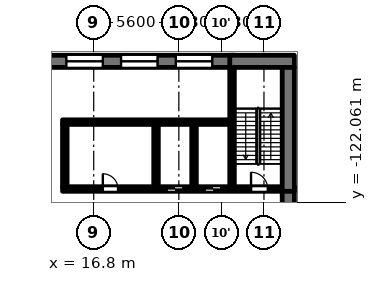
"""IFC4 building model, lengths in metres.
Left out: names, types, materials, properties, quantities, classifications, styles, units other than length and angle.
Written with IfcOpenShell. Run it as: python <this file> out.ifc"""

import sys

from ifc_helpers import new_model, si_unit, direction, frame, frame_2d, origin, place, context, subcontext, project, spatial, rectangle, extrude, element, fill, save


model = new_model("IFC4")
c1 = context("Model", 3, precision=1e-05, world=origin(), true_north=direction((0.0, 1.0)))
c2 = subcontext(c1, "Body", "Model", "MODEL_VIEW")
j1 = project(units=[si_unit("LENGTHUNIT", "METRE"), si_unit("PLANEANGLEUNIT", "RADIAN")], contexts=[c1])
p1 = place(None, origin())
s1 = spatial("IfcSite", under=j1, at=p1, CompositionType="ELEMENT")
p2 = place(p1, origin())
s2 = spatial("IfcBuilding", under=s1, at=p2, CompositionType="ELEMENT")
p3 = place(p2, frame((0.0, 0.0, 6.5)))
s3 = spatial("IfcBuildingStorey", under=s2, at=p3, CompositionType="ELEMENT", Elevation=6.5)
p4 = place(p3, frame((14.75, -121.2, 0.0), z_axis=(0.0, 0.0, 1.0), x_axis=(1.0, 0.0, 0.0)))
e1 = element("IfcWall", 1, at=p4, inside=s3, PredefinedType="SOLIDWALL", context=c2, shape_type="SweptSolid", body=[
    extrude(rectangle(XDim=14.45, YDim=0.3, at=frame_2d((7.225, 0.0))), origin(), (0.0, 0.0, 1.0), 4.45),
])
p5 = place(p4, frame((6.85, 0.0, 0.0)))
e2 = element("IfcOpeningElement", 2, at=p5, cuts=e1, PredefinedType="OPENING", context=c2, shape_type="SweptSolid", body=[
    extrude(rectangle(XDim=1.1, YDim=2.1, at=frame_2d((0.55, 1.05))), frame((0.0, 0.16, 0.0), z_axis=(0.0, -1.0, 0.0), x_axis=(1.0, 0.0, 0.0)), (0.0, 0.0, 1.0), 0.32),
])
p6 = place(p4, frame((9.35, 0.0, 0.0)))
e3 = element("IfcOpeningElement", 3, at=p6, cuts=e1, PredefinedType="OPENING", context=c2, shape_type="SweptSolid", body=[
    extrude(rectangle(XDim=1.1, YDim=2.1, at=frame_2d((0.55, 1.05))), frame((0.0, 0.16, 0.0), z_axis=(0.0, -1.0, 0.0), x_axis=(1.0, 0.0, 0.0)), (0.0, 0.0, 1.0), 0.32),
])
p7 = place(p4, frame((12.4, 0.0, 0.0)))
e4 = element("IfcOpeningElement", 4, at=p7, cuts=e1, PredefinedType="OPENING", context=c2, shape_type="SweptSolid", body=[
    extrude(rectangle(XDim=1.1, YDim=2.1, at=frame_2d((0.55, 1.05))), frame((0.0, 0.16, 0.0), z_axis=(0.0, -1.0, 0.0), x_axis=(1.0, 0.0, 0.0)), (0.0, 0.0, 1.0), 0.32),
])
p8 = place(p4, frame((2.65, 0.0, 0.0)))
e5 = element("IfcOpeningElement", 5, at=p8, cuts=e1, PredefinedType="OPENING", context=c2, shape_type="SweptSolid", body=[
    extrude(rectangle(XDim=1.0, YDim=2.1, at=frame_2d((0.5, 1.05))), frame((0.0, 0.16, 0.0), z_axis=(0.0, -1.0, 0.0), x_axis=(1.0, 0.0, 0.0)), (0.0, 0.0, 1.0), 0.32),
])
p9 = place(p3, frame((14.75, -116.8, 0.0), z_axis=(0.0, 0.0, 1.0), x_axis=(1.0, 0.0, 0.0)))
e6 = element("IfcWall", 6, at=p9, inside=s3, PredefinedType="SOLIDWALL", context=c2, shape_type="SweptSolid", body=[
    extrude(rectangle(XDim=11.0, YDim=0.3, at=frame_2d((5.5, 0.0))), origin(), (0.0, 0.0, 1.0), 4.45),
])
p10 = place(p3, frame((-26.05, -112.8, 0.0), z_axis=(0.0, 0.0, 1.0), x_axis=(1.0, 0.0, 0.0)))
e7 = element("IfcWall", 7, at=p10, inside=s3, PredefinedType="SOLIDWALL", context=c2, shape_type="SweptSolid", body=[
    extrude(rectangle(XDim=52.1, YDim=0.8, at=frame_2d((26.05, 0.0))), origin(), (0.0, 0.0, 1.0), 4.45),
])
p11 = place(p10, frame((1.45, 0.0, 0.6)))
e8 = element("IfcOpeningElement", 8, at=p11, cuts=e7, PredefinedType="OPENING", context=c2, shape_type="SweptSolid", body=[
    extrude(rectangle(XDim=2.4, YDim=3.2, at=frame_2d((1.2, 1.6))), frame((0.0, 0.41, 0.0), z_axis=(0.0, -1.0, 0.0), x_axis=(1.0, 0.0, 0.0)), (0.0, 0.0, 1.0), 0.82),
])
p12 = place(p10, frame((5.05, 0.0, 0.6)))
e9 = element("IfcOpeningElement", 9, at=p12, cuts=e7, PredefinedType="OPENING", context=c2, shape_type="SweptSolid", body=[
    extrude(rectangle(XDim=2.4, YDim=3.2, at=frame_2d((1.2, 1.6))), frame((0.0, 0.41, 0.0), z_axis=(0.0, -1.0, 0.0), x_axis=(1.0, 0.0, 0.0)), (0.0, 0.0, 1.0), 0.82),
])
p13 = place(p10, frame((8.65, 0.0, 0.6)))
e10 = element("IfcOpeningElement", 10, at=p13, cuts=e7, PredefinedType="OPENING", context=c2, shape_type="SweptSolid", body=[
    extrude(rectangle(XDim=2.4, YDim=3.2, at=frame_2d((1.2, 1.6))), frame((0.0, 0.41, 0.0), z_axis=(0.0, -1.0, 0.0), x_axis=(1.0, 0.0, 0.0)), (0.0, 0.0, 1.0), 0.82),
])
p14 = place(p10, frame((12.25, 0.0, 0.6)))
e11 = element("IfcOpeningElement", 11, at=p14, cuts=e7, PredefinedType="OPENING", context=c2, shape_type="SweptSolid", body=[
    extrude(rectangle(XDim=2.4, YDim=3.2, at=frame_2d((1.2, 1.6))), frame((0.0, 0.41, 0.0), z_axis=(0.0, -1.0, 0.0), x_axis=(1.0, 0.0, 0.0)), (0.0, 0.0, 1.0), 0.82),
])
p15 = place(p10, frame((15.85, 0.0, 0.6)))
e12 = element("IfcOpeningElement", 12, at=p15, cuts=e7, PredefinedType="OPENING", context=c2, shape_type="SweptSolid", body=[
    extrude(rectangle(XDim=2.4, YDim=3.2, at=frame_2d((1.2, 1.6))), frame((0.0, 0.41, 0.0), z_axis=(0.0, -1.0, 0.0), x_axis=(1.0, 0.0, 0.0)), (0.0, 0.0, 1.0), 0.82),
])
p16 = place(p10, frame((19.45, 0.0, 0.6)))
e13 = element("IfcOpeningElement", 13, at=p16, cuts=e7, PredefinedType="OPENING", context=c2, shape_type="SweptSolid", body=[
    extrude(rectangle(XDim=2.4, YDim=3.2, at=frame_2d((1.2, 1.6))), frame((0.0, 0.41, 0.0), z_axis=(0.0, -1.0, 0.0), x_axis=(1.0, 0.0, 0.0)), (0.0, 0.0, 1.0), 0.82),
])
p17 = place(p10, frame((23.05, 0.0, 0.6)))
e14 = element("IfcOpeningElement", 14, at=p17, cuts=e7, PredefinedType="OPENING", context=c2, shape_type="SweptSolid", body=[
    extrude(rectangle(XDim=2.4, YDim=3.2, at=frame_2d((1.2, 1.6))), frame((0.0, 0.41, 0.0), z_axis=(0.0, -1.0, 0.0), x_axis=(1.0, 0.0, 0.0)), (0.0, 0.0, 1.0), 0.82),
])
p18 = place(p10, frame((26.65, 0.0, 0.6)))
e15 = element("IfcOpeningElement", 15, at=p18, cuts=e7, PredefinedType="OPENING", context=c2, shape_type="SweptSolid", body=[
    extrude(rectangle(XDim=2.4, YDim=3.2, at=frame_2d((1.2, 1.6))), frame((0.0, 0.41, 0.0), z_axis=(0.0, -1.0, 0.0), x_axis=(1.0, 0.0, 0.0)), (0.0, 0.0, 1.0), 0.82),
])
p19 = place(p10, frame((30.25, 0.0, 0.6)))
e16 = element("IfcOpeningElement", 16, at=p19, cuts=e7, PredefinedType="OPENING", context=c2, shape_type="SweptSolid", body=[
    extrude(rectangle(XDim=2.4, YDim=3.2, at=frame_2d((1.2, 1.6))), frame((0.0, 0.41, 0.0), z_axis=(0.0, -1.0, 0.0), x_axis=(1.0, 0.0, 0.0)), (0.0, 0.0, 1.0), 0.82),
])
p20 = place(p10, frame((33.85, 0.0, 0.6)))
e17 = element("IfcOpeningElement", 17, at=p20, cuts=e7, PredefinedType="OPENING", context=c2, shape_type="SweptSolid", body=[
    extrude(rectangle(XDim=2.4, YDim=3.2, at=frame_2d((1.2, 1.6))), frame((0.0, 0.41, 0.0), z_axis=(0.0, -1.0, 0.0), x_axis=(1.0, 0.0, 0.0)), (0.0, 0.0, 1.0), 0.82),
])
p21 = place(p10, frame((37.45, 0.0, 0.6)))
e18 = element("IfcOpeningElement", 18, at=p21, cuts=e7, PredefinedType="OPENING", context=c2, shape_type="SweptSolid", body=[
    extrude(rectangle(XDim=2.4, YDim=3.2, at=frame_2d((1.2, 1.6))), frame((0.0, 0.41, 0.0), z_axis=(0.0, -1.0, 0.0), x_axis=(1.0, 0.0, 0.0)), (0.0, 0.0, 1.0), 0.82),
])
p22 = place(p10, frame((41.05, 0.0, 0.6)))
e19 = element("IfcOpeningElement", 19, at=p22, cuts=e7, PredefinedType="OPENING", context=c2, shape_type="SweptSolid", body=[
    extrude(rectangle(XDim=2.4, YDim=3.2, at=frame_2d((1.2, 1.6))), frame((0.0, 0.41, 0.0), z_axis=(0.0, -1.0, 0.0), x_axis=(1.0, 0.0, 0.0)), (0.0, 0.0, 1.0), 0.82),
])
p23 = place(p10, frame((44.65, 0.0, 0.6)))
e20 = element("IfcOpeningElement", 20, at=p23, cuts=e7, PredefinedType="OPENING", context=c2, shape_type="SweptSolid", body=[
    extrude(rectangle(XDim=2.4, YDim=3.2, at=frame_2d((1.2, 1.6))), frame((0.0, 0.41, 0.0), z_axis=(0.0, -1.0, 0.0), x_axis=(1.0, 0.0, 0.0)), (0.0, 0.0, 1.0), 0.82),
])
p24 = place(p10, frame((48.25, 0.0, 0.6)))
e21 = element("IfcOpeningElement", 21, at=p24, cuts=e7, PredefinedType="OPENING", context=c2, shape_type="SweptSolid", body=[
    extrude(rectangle(XDim=2.4, YDim=3.2, at=frame_2d((1.2, 1.6))), frame((0.0, 0.41, 0.0), z_axis=(0.0, -1.0, 0.0), x_axis=(1.0, 0.0, 0.0)), (0.0, 0.0, 1.0), 0.82),
])
p25 = place(p3, frame((25.75, -112.8, 0.0), z_axis=(0.0, 0.0, 1.0), x_axis=(1.0, 0.0, 0.0)))
e22 = element("IfcWall", 22, at=p25, inside=s3, PredefinedType="SOLIDWALL", context=c2, shape_type="SweptSolid", body=[
    extrude(rectangle(XDim=4.25, YDim=0.8, at=frame_2d((2.125, 0.0))), origin(), (0.0, 0.0, 1.0), 4.45),
])
for number, where, z_axis, x_axis in (
    (23, (14.9, -121.05, 0.0), (0.0, 0.0, 1.0), (0.0, 1.0, 0.0)),
    (24, (20.9, -121.05, 0.0), (0.0, 0.0, 1.0), (0.0, 1.0, 0.0)),
    (25, (23.4, -121.05, 0.0), (0.0, 0.0, 1.0), (0.0, 1.0, 0.0)),
):
    element("IfcWall", number, at=place(p3, frame(where, z_axis=z_axis, x_axis=x_axis)), inside=s3, PredefinedType="SOLIDWALL", context=c2, shape_type="SweptSolid", body=[
        extrude(rectangle(XDim=4.1, YDim=0.3, at=frame_2d((2.05, 0.0))), origin(), (0.0, 0.0, 1.0), 4.45),
    ])
p26 = place(p3, frame((25.9, -121.05, 0.0), z_axis=(0.0, 0.0, 1.0), x_axis=(0.0, 1.0, 0.0)))
e26 = element("IfcWall", 26, at=p26, inside=s3, PredefinedType="SOLIDWALL", context=c2, shape_type="SweptSolid", body=[
    extrude(rectangle(XDim=7.85, YDim=0.3, at=frame_2d((3.925, 0.0))), origin(), (0.0, 0.0, 1.0), 4.45),
])
p27 = place(p3, frame((29.6, -121.05, 0.0), z_axis=(0.0, 0.0, 1.0), x_axis=(0.0, -1.0, 0.0)))
e27 = element("IfcWall", 27, at=p27, inside=s3, PredefinedType="SOLIDWALL", context=c2, shape_type="SweptSolid", body=[
    extrude(rectangle(XDim=3.875, YDim=0.8, at=frame_2d((1.938, 0.0))), origin(), (0.0, 0.0, 1.0), 4.45),
])
p28 = place(p3, frame((29.6, -113.2, 0.0), z_axis=(0.0, 0.0, 1.0), x_axis=(0.0, -1.0, 0.0)))
e28 = element("IfcWall", 28, at=p28, inside=s3, PredefinedType="SOLIDWALL", context=c2, shape_type="SweptSolid", body=[
    extrude(rectangle(XDim=8.15, YDim=0.8, at=frame_2d((4.075, 0.0))), origin(), (0.0, 0.0, 1.0), 4.45),
])
p29 = place(p22, origin())
e29 = element("IfcWindow", 29, at=p29, inside=s3, PartitioningType="SINGLE_PANEL", PredefinedType="WINDOW", context=c2, shape_type="SweptSolid", body=[
    extrude(rectangle(XDim=2.4, YDim=3.2, at=frame_2d((1.2, 1.6))), frame((0.0, 0.03, 0.0), z_axis=(0.0, -1.0, 0.0), x_axis=(1.0, 0.0, 0.0)), (0.0, 0.0, 1.0), 0.06),
])
fill(e19, e29)
p30 = place(p23, origin())
e30 = element("IfcWindow", 30, at=p30, inside=s3, PartitioningType="SINGLE_PANEL", PredefinedType="WINDOW", context=c2, shape_type="SweptSolid", body=[
    extrude(rectangle(XDim=2.4, YDim=3.2, at=frame_2d((1.2, 1.6))), frame((0.0, 0.03, 0.0), z_axis=(0.0, -1.0, 0.0), x_axis=(1.0, 0.0, 0.0)), (0.0, 0.0, 1.0), 0.06),
])
fill(e20, e30)
p31 = place(p24, origin())
e31 = element("IfcWindow", 31, at=p31, inside=s3, PartitioningType="SINGLE_PANEL", PredefinedType="WINDOW", context=c2, shape_type="SweptSolid", body=[
    extrude(rectangle(XDim=2.4, YDim=3.2, at=frame_2d((1.2, 1.6))), frame((0.0, 0.03, 0.0), z_axis=(0.0, -1.0, 0.0), x_axis=(1.0, 0.0, 0.0)), (0.0, 0.0, 1.0), 0.06),
])
fill(e21, e31)
p32 = place(p5, origin())
e32 = element("IfcDoor", 32, at=p32, inside=s3, OperationType="DOUBLE_DOOR_SLIDING", PredefinedType="DOOR", context=c2, shape_type="SweptSolid", body=[
    extrude(rectangle(XDim=1.1, YDim=2.1, at=frame_2d((0.55, 1.05))), frame((0.0, 0.025, 0.0), z_axis=(0.0, -1.0, 0.0), x_axis=(1.0, 0.0, 0.0)), (0.0, 0.0, 1.0), 0.05),
])
fill(e2, e32)
p33 = place(p6, origin())
e33 = element("IfcDoor", 33, at=p33, inside=s3, OperationType="DOUBLE_DOOR_SLIDING", PredefinedType="DOOR", context=c2, shape_type="SweptSolid", body=[
    extrude(rectangle(XDim=1.1, YDim=2.1, at=frame_2d((0.55, 1.05))), frame((0.0, 0.025, 0.0), z_axis=(0.0, -1.0, 0.0), x_axis=(1.0, 0.0, 0.0)), (0.0, 0.0, 1.0), 0.05),
])
fill(e3, e33)
p34 = place(p7, origin())
e34 = element("IfcDoor", 34, at=p34, inside=s3, OperationType="SINGLE_SWING_LEFT", PredefinedType="DOOR", context=c2, shape_type="SweptSolid", body=[
    extrude(rectangle(XDim=1.1, YDim=2.1, at=frame_2d((0.55, 1.05))), frame((0.0, 0.025, 0.0), z_axis=(0.0, -1.0, 0.0), x_axis=(1.0, 0.0, 0.0)), (0.0, 0.0, 1.0), 0.05),
])
fill(e4, e34)
p35 = place(p8, origin())
e35 = element("IfcDoor", 35, at=p35, inside=s3, OperationType="SINGLE_SWING_LEFT", PredefinedType="DOOR", context=c2, shape_type="SweptSolid", body=[
    extrude(rectangle(XDim=1.0, YDim=2.1, at=frame_2d((0.5, 1.05))), frame((0.0, 0.025, 0.0), z_axis=(0.0, -1.0, 0.0), x_axis=(1.0, 0.0, 0.0)), (0.0, 0.0, 1.0), 0.05),
])
fill(e5, e35)
save(model, sys.argv[1])
